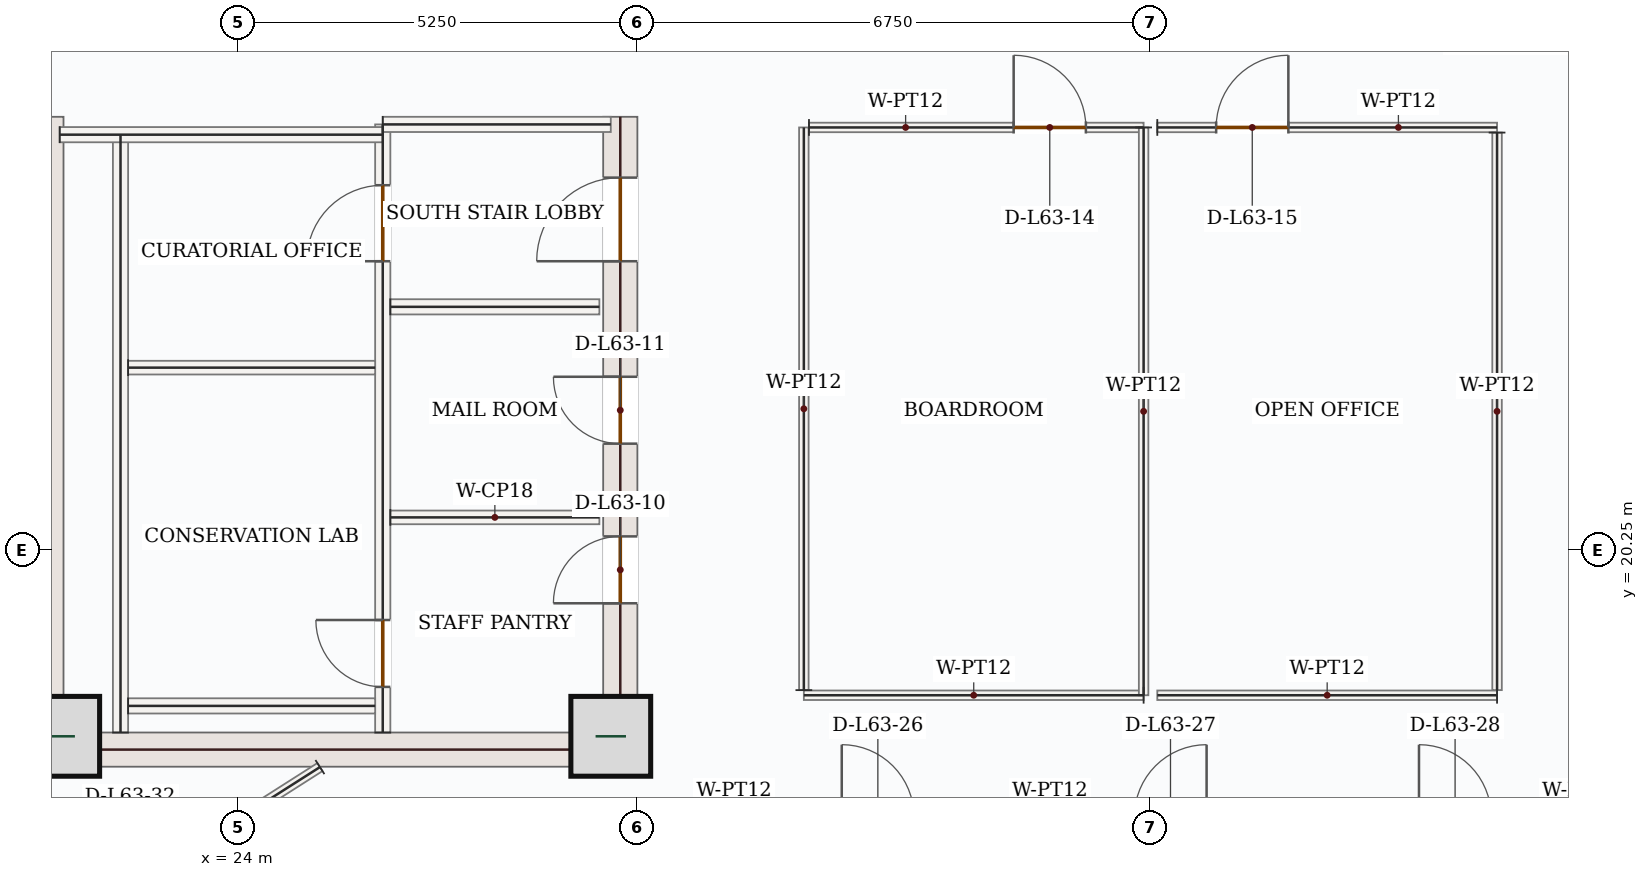
"""IFC4 building model, lengths in metres.
Left out: names, types, materials, properties, quantities, classifications, styles, units other than length and angle.
Written with IfcOpenShell. Run it as: python <this file> out.ifc"""

import sys

from ifc_helpers import new_model, si_unit, direction, frame, frame_2d, origin, origin_2d, place, context, subcontext, project, spatial, rectangle, extrude, source, transform, mapped, element, fill, save


model = new_model("IFC4")
c1 = context("Model", 3, precision=1e-05, world=origin(), true_north=direction((0.0, 1.0)))
c2 = subcontext(c1, "Body", "Model", "MODEL_VIEW")
j1 = project(units=[si_unit("LENGTHUNIT", "METRE"), si_unit("PLANEANGLEUNIT", "RADIAN")], contexts=[c1])
p1 = place(None, origin())
s1 = spatial("IfcSite", under=j1, at=p1, CompositionType="ELEMENT")
p2 = place(p1, origin())
s2 = spatial("IfcBuilding", under=s1, at=p2, CompositionType="ELEMENT")
p3 = place(p2, frame((0.0, 0.0, 265.35)))
s3 = spatial("IfcBuildingStorey", under=s2, at=p3, CompositionType="ELEMENT", Elevation=265.35)
m1 = source(origin(), c2, "Body", "SweptSolid", [
    extrude(rectangle(XDim=8.55, YDim=0.45, at=frame_2d((4.275, 0.0))), origin(), (0.0, 0.0, 1.0), 3.5),
])
p4 = place(p3, frame((21.475, 17.4, 0.0), z_axis=(0.0, 0.0, 1.0), x_axis=(0.0, 1.0, 0.0)))
e1 = element("IfcWall", 1, at=p4, inside=s3, PredefinedType="SHEAR", context=c2, shape_type="MappedRepresentation", body=[
    mapped(m1, transform((0.0, 0.0, 0.0), x_axis=(1.0, 0.0, 0.0), y_axis=(0.0, 1.0, 0.0), z_axis=(0.0, 0.0, 1.0), scale=1.0)),
])
p5 = place(p3, frame((29.025, 17.4, 0.0), z_axis=(0.0, 0.0, 1.0), x_axis=(0.0, 1.0, 0.0)))
e2 = element("IfcWall", 2, at=p5, inside=s3, PredefinedType="SHEAR", context=c2, shape_type="SweptSolid", body=[
    extrude(rectangle(XDim=8.55, YDim=0.45, at=frame_2d((4.275, 0.0))), origin(), (0.0, 0.0, 1.0), 3.5),
])
p6 = place(p5, frame((6.65, 0.0, 0.0)))
e3 = element("IfcOpeningElement", 3, at=p6, cuts=e2, PredefinedType="OPENING", context=c2, shape_type="SweptSolid", body=[
    extrude(rectangle(XDim=1.1, YDim=2.2, at=frame_2d((0.55, 1.1))), frame((0.0, 0.235, 0.0), z_axis=(0.0, -1.0, 0.0), x_axis=(1.0, 0.0, 0.0)), (0.0, 0.0, 1.0), 0.47),
])
p7 = place(p5, frame((2.15, 0.0, 0.0)))
e4 = element("IfcOpeningElement", 4, at=p7, cuts=e2, PredefinedType="OPENING", context=c2, shape_type="SweptSolid", body=[
    extrude(rectangle(XDim=0.88, YDim=2.1, at=frame_2d((0.44, 1.05))), frame((0.0, 0.235, 0.0), z_axis=(0.0, -1.0, 0.0), x_axis=(1.0, 0.0, 0.0)), (0.0, 0.0, 1.0), 0.47),
])
p8 = place(p5, frame((4.25, 0.0, 0.0)))
e5 = element("IfcOpeningElement", 5, at=p8, cuts=e2, PredefinedType="OPENING", context=c2, shape_type="SweptSolid", body=[
    extrude(rectangle(XDim=0.88, YDim=2.1, at=frame_2d((0.44, 1.05))), frame((0.0, 0.235, 0.0), z_axis=(0.0, -1.0, 0.0), x_axis=(1.0, 0.0, 0.0)), (0.0, 0.0, 1.0), 0.47),
])
m2 = source(origin(), c2, "Body", "SweptSolid", [
    extrude(rectangle(XDim=7.1, YDim=0.45, at=frame_2d((3.55, 0.0))), origin(), (0.0, 0.0, 1.0), 3.5),
])
p9 = place(p3, frame((21.7, 17.625, 0.0), z_axis=(0.0, 0.0, 1.0), x_axis=(1.0, 0.0, 0.0)))
e6 = element("IfcWall", 6, at=p9, inside=s3, PredefinedType="SHEAR", context=c2, shape_type="MappedRepresentation", body=[
    mapped(m2, transform((0.0, 0.0, 0.0), x_axis=(1.0, 0.0, 0.0), y_axis=(0.0, 1.0, 0.0), z_axis=(0.0, 0.0, 1.0), scale=1.0)),
])
m3 = source(origin(), c2, "Body", "SweptSolid", [
    extrude(rectangle(XDim=1.05, YDim=1.05, at=origin_2d()), origin(), (0.0, 0.0, 1.0), 3.75),
])
for number, where, z_axis, x_axis in (
    (7, (21.65, 17.8, 0.0), (0.0, 0.0, 1.0), (1.0, 0.0, 0.0)),
    (8, (28.9, 17.8, 0.0), (0.0, 0.0, 1.0), (1.0, 0.0, 0.0)),
):
    element("IfcColumn", number, at=place(p3, frame(where, z_axis=z_axis, x_axis=x_axis)), inside=s3, PredefinedType="COLUMN", context=c2, shape_type="MappedRepresentation", body=[
        mapped(m3, transform((0.0, 0.0, 0.0), x_axis=(1.0, 0.0, 0.0), y_axis=(0.0, 1.0, 0.0), z_axis=(0.0, 0.0, 1.0), scale=1.0)),
    ])
m4 = source(origin(), c2, "Body", "SweptSolid", [
    extrude(rectangle(XDim=7.87, YDim=0.2, at=frame_2d((3.935, 0.0))), origin(), (0.0, 0.0, 1.0), 3.5),
])
p10 = place(p3, frame((22.45, 17.85, 0.0), z_axis=(0.0, 0.0, 1.0), x_axis=(0.0, 1.0, 0.0)))
e9 = element("IfcWall", 9, at=p10, inside=s3, PredefinedType="SOLIDWALL", context=c2, shape_type="MappedRepresentation", body=[
    mapped(m4, transform((0.0, 0.0, 0.0), x_axis=(1.0, 0.0, 0.0), y_axis=(0.0, 1.0, 0.0), z_axis=(0.0, 0.0, 1.0), scale=1.0)),
])
p11 = place(p3, frame((25.9, 17.85, 0.0), z_axis=(0.0, 0.0, 1.0), x_axis=(0.0, 1.0, 0.0)))
e10 = element("IfcWall", 10, at=p11, inside=s3, PredefinedType="SOLIDWALL", context=c2, shape_type="SweptSolid", body=[
    extrude(rectangle(XDim=8.0, YDim=0.2, at=frame_2d((4.0, 0.0))), origin(), (0.0, 0.0, 1.0), 3.5),
])
p12 = place(p11, frame((6.2, 0.0, 0.0)))
e11 = element("IfcOpeningElement", 11, at=p12, cuts=e10, PredefinedType="OPENING", context=c2, shape_type="SweptSolid", body=[
    extrude(rectangle(XDim=1.0, YDim=2.15, at=frame_2d((0.5, 1.075))), frame((0.0, 0.11, 0.0), z_axis=(0.0, -1.0, 0.0), x_axis=(1.0, 0.0, 0.0)), (0.0, 0.0, 1.0), 0.22),
])
p13 = place(p11, frame((0.6, 0.0, 0.0)))
e12 = element("IfcOpeningElement", 12, at=p13, cuts=e10, PredefinedType="OPENING", context=c2, shape_type="SweptSolid", body=[
    extrude(rectangle(XDim=0.88, YDim=2.1, at=frame_2d((0.44, 1.05))), frame((0.0, 0.11, 0.0), z_axis=(0.0, -1.0, 0.0), x_axis=(1.0, 0.0, 0.0)), (0.0, 0.0, 1.0), 0.22),
])
m5 = source(origin(), c2, "Body", "SweptSolid", [
    extrude(rectangle(XDim=4.25, YDim=0.2, at=frame_2d((2.125, 0.0))), origin(), (0.0, 0.0, 1.0), 3.5),
])
p14 = place(p3, frame((21.65, 25.715, 0.0), z_axis=(0.0, 0.0, 1.0), x_axis=(1.0, 0.0, 0.0)))
e13 = element("IfcWall", 13, at=p14, inside=s3, PredefinedType="SOLIDWALL", context=c2, shape_type="MappedRepresentation", body=[
    mapped(m5, transform((0.0, 0.0, 0.0), x_axis=(1.0, 0.0, 0.0), y_axis=(0.0, 1.0, 0.0), z_axis=(0.0, 0.0, 1.0), scale=1.0)),
])
m6 = source(origin(), c2, "Body", "SweptSolid", [
    extrude(rectangle(XDim=3.0, YDim=0.2, at=frame_2d((1.5, 0.0))), origin(), (0.0, 0.0, 1.0), 3.5),
])
p15 = place(p3, frame((25.9, 25.85, 0.0), z_axis=(0.0, 0.0, 1.0), x_axis=(1.0, 0.0, 0.0)))
e14 = element("IfcWall", 14, at=p15, inside=s3, PredefinedType="SOLIDWALL", context=c2, shape_type="MappedRepresentation", body=[
    mapped(m6, transform((0.0, 0.0, 0.0), x_axis=(1.0, 0.0, 0.0), y_axis=(0.0, 1.0, 0.0), z_axis=(0.0, 0.0, 1.0), scale=1.0)),
])
m7 = source(origin(), c2, "Body", "SweptSolid", [
    extrude(rectangle(XDim=3.25, YDim=0.2, at=frame_2d((1.625, 0.0))), origin(), (0.0, 0.0, 1.0), 3.5),
])
p16 = place(p3, frame((22.55, 18.2, 0.0), z_axis=(0.0, 0.0, 1.0), x_axis=(1.0, 0.0, 0.0)))
e15 = element("IfcWall", 15, at=p16, inside=s3, PredefinedType="SOLIDWALL", context=c2, shape_type="MappedRepresentation", body=[
    mapped(m7, transform((0.0, 0.0, 0.0), x_axis=(1.0, 0.0, 0.0), y_axis=(0.0, 1.0, 0.0), z_axis=(0.0, 0.0, 1.0), scale=1.0)),
])
m8 = source(origin(), c2, "Body", "SweptSolid", [
    extrude(rectangle(XDim=3.25, YDim=0.18, at=frame_2d((1.625, 0.0))), origin(), (0.0, 0.0, 1.0), 3.5),
])
p17 = place(p3, frame((22.55, 22.65, 0.0), z_axis=(0.0, 0.0, 1.0), x_axis=(1.0, 0.0, 0.0)))
e16 = element("IfcWall", 16, at=p17, inside=s3, PredefinedType="PARTITIONING", context=c2, shape_type="MappedRepresentation", body=[
    mapped(m8, transform((0.0, 0.0, 0.0), x_axis=(1.0, 0.0, 0.0), y_axis=(0.0, 1.0, 0.0), z_axis=(0.0, 0.0, 1.0), scale=1.0)),
])
m9 = source(origin(), c2, "Body", "SweptSolid", [
    extrude(rectangle(XDim=2.75, YDim=0.2, at=frame_2d((1.375, 0.0))), origin(), (0.0, 0.0, 1.0), 3.5),
])
p18 = place(p3, frame((26.0, 23.45, 0.0), z_axis=(0.0, 0.0, 1.0), x_axis=(1.0, 0.0, 0.0)))
e17 = element("IfcWall", 17, at=p18, inside=s3, PredefinedType="SOLIDWALL", context=c2, shape_type="MappedRepresentation", body=[
    mapped(m9, transform((0.0, 0.0, 0.0), x_axis=(1.0, 0.0, 0.0), y_axis=(0.0, 1.0, 0.0), z_axis=(0.0, 0.0, 1.0), scale=1.0)),
])
m10 = source(origin(), c2, "Body", "SweptSolid", [
    extrude(rectangle(XDim=2.75, YDim=0.18, at=frame_2d((1.375, 0.0))), origin(), (0.0, 0.0, 1.0), 3.5),
])
p19 = place(p3, frame((26.0, 20.68, 0.0), z_axis=(0.0, 0.0, 1.0), x_axis=(1.0, 0.0, 0.0)))
e18 = element("IfcWall", 18, at=p19, inside=s3, PredefinedType="PARTITIONING", context=c2, shape_type="MappedRepresentation", body=[
    mapped(m10, transform((0.0, 0.0, 0.0), x_axis=(1.0, 0.0, 0.0), y_axis=(0.0, 1.0, 0.0), z_axis=(0.0, 0.0, 1.0), scale=1.0)),
])
p20 = place(p3, frame((25.073, 17.395, 0.0), z_axis=(0.0, 0.0, 1.0), x_axis=(-0.843398332862, -0.537288797693, 0.0)))
e19 = element("IfcWall", 19, at=p20, inside=s3, PredefinedType="PARTITIONING", context=c2, shape_type="SweptSolid", body=[
    extrude(rectangle(XDim=5.924, YDim=0.125, at=frame_2d((2.962, 0.0))), origin(), (0.0, 0.0, 1.0), 3.5),
])
p21 = place(p20, frame((2.487, 0.0, 0.0)))
e20 = element("IfcOpeningElement", 20, at=p21, cuts=e19, PredefinedType="OPENING", context=c2, shape_type="SweptSolid", body=[
    extrude(rectangle(XDim=0.95, YDim=2.15, at=frame_2d((0.475, 1.075))), frame((0.0, 0.073, 0.0), z_axis=(0.0, -1.0, 0.0), x_axis=(1.0, 0.0, 0.0)), (0.0, 0.0, 1.0), 0.145),
])
m11 = source(origin(), c2, "Body", "SweptSolid", [
    extrude(rectangle(XDim=4.47, YDim=0.125, at=frame_2d((2.235, 0.0))), origin(), (0.0, 0.0, 1.0), 3.5),
])
p22 = place(p3, frame((35.91, 18.34, 0.0), z_axis=(0.0, 0.0, 1.0), x_axis=(-1.0, 0.0, 0.0)))
e21 = element("IfcWall", 21, at=p22, inside=s3, PredefinedType="PARTITIONING", context=c2, shape_type="MappedRepresentation", body=[
    mapped(m11, transform((0.0, 0.0, 0.0), x_axis=(1.0, 0.0, 0.0), y_axis=(0.0, 1.0, 0.0), z_axis=(0.0, 0.0, 1.0), scale=1.0)),
])
m12 = source(origin(), c2, "Body", "SweptSolid", [
    extrude(rectangle(XDim=7.403, YDim=0.125, at=frame_2d((3.701, 0.0))), origin(), (0.0, 0.0, 1.0), 3.5),
])
p23 = place(p3, frame((31.44, 18.407, 0.0), z_axis=(0.0, 0.0, 1.0), x_axis=(0.0, 1.0, 0.0)))
e22 = element("IfcWall", 22, at=p23, inside=s3, PredefinedType="PARTITIONING", context=c2, shape_type="MappedRepresentation", body=[
    mapped(m12, transform((0.0, 0.0, 0.0), x_axis=(1.0, 0.0, 0.0), y_axis=(0.0, 1.0, 0.0), z_axis=(0.0, 0.0, 1.0), scale=1.0)),
])
p24 = place(p3, frame((31.508, 25.81, 0.0), z_axis=(0.0, 0.0, 1.0), x_axis=(1.0, 0.0, 0.0)))
e23 = element("IfcWall", 23, at=p24, inside=s3, PredefinedType="PARTITIONING", context=c2, shape_type="SweptSolid", body=[
    extrude(rectangle(XDim=4.402, YDim=0.125, at=frame_2d((2.201, 0.0))), origin(), (0.0, 0.0, 1.0), 3.5),
])
p25 = place(p24, frame((2.693, 0.0, 0.0)))
e24 = element("IfcOpeningElement", 24, at=p25, cuts=e23, PredefinedType="OPENING", context=c2, shape_type="SweptSolid", body=[
    extrude(rectangle(XDim=0.95, YDim=2.15, at=frame_2d((0.475, 1.075))), frame((0.0, 0.073, 0.0), z_axis=(0.0, -1.0, 0.0), x_axis=(1.0, 0.0, 0.0)), (0.0, 0.0, 1.0), 0.145),
])
m13 = source(origin(), c2, "Body", "SweptSolid", [
    extrude(rectangle(XDim=7.47, YDim=0.125, at=frame_2d((3.735, 0.0))), origin(), (0.0, 0.0, 1.0), 3.5),
])
p26 = place(p3, frame((35.91, 25.81, 0.0), z_axis=(0.0, 0.0, 1.0), x_axis=(0.0, -1.0, 0.0)))
e25 = element("IfcWall", 25, at=p26, inside=s3, PredefinedType="PARTITIONING", context=c2, shape_type="MappedRepresentation", body=[
    mapped(m13, transform((0.0, 0.0, 0.0), x_axis=(1.0, 0.0, 0.0), y_axis=(0.0, 1.0, 0.0), z_axis=(0.0, 0.0, 1.0), scale=1.0)),
])
p27 = place(p3, frame((40.56, 18.34, 0.0), z_axis=(0.0, 0.0, 1.0), x_axis=(-1.0, 0.0, 0.0)))
e26 = element("IfcWall", 26, at=p27, inside=s3, PredefinedType="PARTITIONING", context=c2, shape_type="MappedRepresentation", body=[
    mapped(m11, transform((0.0, 0.0, 0.0), x_axis=(1.0, 0.0, 0.0), y_axis=(0.0, 1.0, 0.0), z_axis=(0.0, 0.0, 1.0), scale=1.0)),
])
p28 = place(p3, frame((36.09, 25.81, 0.0), z_axis=(0.0, 0.0, 1.0), x_axis=(1.0, 0.0, 0.0)))
e27 = element("IfcWall", 27, at=p28, inside=s3, PredefinedType="PARTITIONING", context=c2, shape_type="SweptSolid", body=[
    extrude(rectangle(XDim=4.47, YDim=0.125, at=frame_2d((2.235, 0.0))), origin(), (0.0, 0.0, 1.0), 3.5),
])
p29 = place(p28, frame((0.774, 0.0, 0.0)))
e28 = element("IfcOpeningElement", 28, at=p29, cuts=e27, PredefinedType="OPENING", context=c2, shape_type="SweptSolid", body=[
    extrude(rectangle(XDim=0.95, YDim=2.15, at=frame_2d((0.475, 1.075))), frame((0.0, 0.073, 0.0), z_axis=(0.0, -1.0, 0.0), x_axis=(1.0, 0.0, 0.0)), (0.0, 0.0, 1.0), 0.145),
])
m14 = source(origin(), c2, "Body", "SweptSolid", [
    extrude(rectangle(XDim=7.335, YDim=0.125, at=frame_2d((3.667, 0.0))), origin(), (0.0, 0.0, 1.0), 3.5),
])
p30 = place(p3, frame((40.56, 25.742, 0.0), z_axis=(0.0, 0.0, 1.0), x_axis=(0.0, -1.0, 0.0)))
e29 = element("IfcWall", 29, at=p30, inside=s3, PredefinedType="PARTITIONING", context=c2, shape_type="MappedRepresentation", body=[
    mapped(m14, transform((0.0, 0.0, 0.0), x_axis=(1.0, 0.0, 0.0), y_axis=(0.0, 1.0, 0.0), z_axis=(0.0, 0.0, 1.0), scale=1.0)),
])
m15 = source(origin(), c2, "Body", "SweptSolid", [
    extrude(rectangle(XDim=1.0, YDim=2.15, at=frame_2d((0.5, 1.075))), frame((0.0, 0.025, 0.0), z_axis=(0.0, -1.0, 0.0), x_axis=(1.0, 0.0, 0.0)), (0.0, 0.0, 1.0), 0.05),
])
p31 = place(p12, origin())
e30 = element("IfcDoor", 30, at=p31, inside=s3, OperationType="SINGLE_SWING_LEFT", PredefinedType="DOOR", context=c2, shape_type="MappedRepresentation", body=[
    mapped(m15, transform((0.0, 0.0, 0.0), x_axis=(1.0, 0.0, 0.0), y_axis=(0.0, 1.0, 0.0), z_axis=(0.0, 0.0, 1.0), scale=1.0)),
])
fill(e11, e30)
m16 = source(origin(), c2, "Body", "SweptSolid", [
    extrude(rectangle(XDim=0.88, YDim=2.1, at=frame_2d((0.44, 1.05))), frame((0.0, 0.025, 0.0), z_axis=(0.0, -1.0, 0.0), x_axis=(1.0, 0.0, 0.0)), (0.0, 0.0, 1.0), 0.05),
])
p32 = place(p13, origin())
e31 = element("IfcDoor", 31, at=p32, inside=s3, OperationType="SINGLE_SWING_RIGHT", PredefinedType="DOOR", context=c2, shape_type="MappedRepresentation", body=[
    mapped(m16, transform((0.0, 0.0, 0.0), x_axis=(1.0, 0.0, 0.0), y_axis=(0.0, 1.0, 0.0), z_axis=(0.0, 0.0, 1.0), scale=1.0)),
])
fill(e12, e31)
m17 = source(origin(), c2, "Body", "SweptSolid", [
    extrude(rectangle(XDim=1.1, YDim=2.2, at=frame_2d((0.55, 1.1))), frame((0.0, 0.025, 0.0), z_axis=(0.0, -1.0, 0.0), x_axis=(1.0, 0.0, 0.0)), (0.0, 0.0, 1.0), 0.05),
])
p33 = place(p6, origin())
e32 = element("IfcDoor", 32, at=p33, inside=s3, OperationType="SINGLE_SWING_LEFT", PredefinedType="DOOR", context=c2, shape_type="MappedRepresentation", body=[
    mapped(m17, transform((0.0, 0.0, 0.0), x_axis=(1.0, 0.0, 0.0), y_axis=(0.0, 1.0, 0.0), z_axis=(0.0, 0.0, 1.0), scale=1.0)),
])
fill(e3, e32)
p34 = place(p7, origin())
e33 = element("IfcDoor", 33, at=p34, inside=s3, OperationType="SINGLE_SWING_LEFT", PredefinedType="DOOR", context=c2, shape_type="MappedRepresentation", body=[
    mapped(m16, transform((0.0, 0.0, 0.0), x_axis=(1.0, 0.0, 0.0), y_axis=(0.0, 1.0, 0.0), z_axis=(0.0, 0.0, 1.0), scale=1.0)),
])
fill(e4, e33)
p35 = place(p8, origin())
e34 = element("IfcDoor", 34, at=p35, inside=s3, OperationType="SINGLE_SWING_RIGHT", PredefinedType="DOOR", context=c2, shape_type="MappedRepresentation", body=[
    mapped(m16, transform((0.0, 0.0, 0.0), x_axis=(1.0, 0.0, 0.0), y_axis=(0.0, 1.0, 0.0), z_axis=(0.0, 0.0, 1.0), scale=1.0)),
])
fill(e5, e34)
m18 = source(origin(), c2, "Body", "SweptSolid", [
    extrude(rectangle(XDim=0.95, YDim=2.15, at=frame_2d((0.475, 1.075))), frame((0.0, 0.025, 0.0), z_axis=(0.0, -1.0, 0.0), x_axis=(1.0, 0.0, 0.0)), (0.0, 0.0, 1.0), 0.05),
])
p36 = place(p25, origin())
e35 = element("IfcDoor", 35, at=p36, inside=s3, OperationType="SINGLE_SWING_LEFT", PredefinedType="DOOR", context=c2, shape_type="MappedRepresentation", body=[
    mapped(m18, transform((0.0, 0.0, 0.0), x_axis=(1.0, 0.0, 0.0), y_axis=(0.0, 1.0, 0.0), z_axis=(0.0, 0.0, 1.0), scale=1.0)),
])
fill(e24, e35)
p37 = place(p29, origin())
e36 = element("IfcDoor", 36, at=p37, inside=s3, OperationType="SINGLE_SWING_RIGHT", PredefinedType="DOOR", context=c2, shape_type="MappedRepresentation", body=[
    mapped(m18, transform((0.0, 0.0, 0.0), x_axis=(1.0, 0.0, 0.0), y_axis=(0.0, 1.0, 0.0), z_axis=(0.0, 0.0, 1.0), scale=1.0)),
])
fill(e28, e36)
save(model, sys.argv[1])
